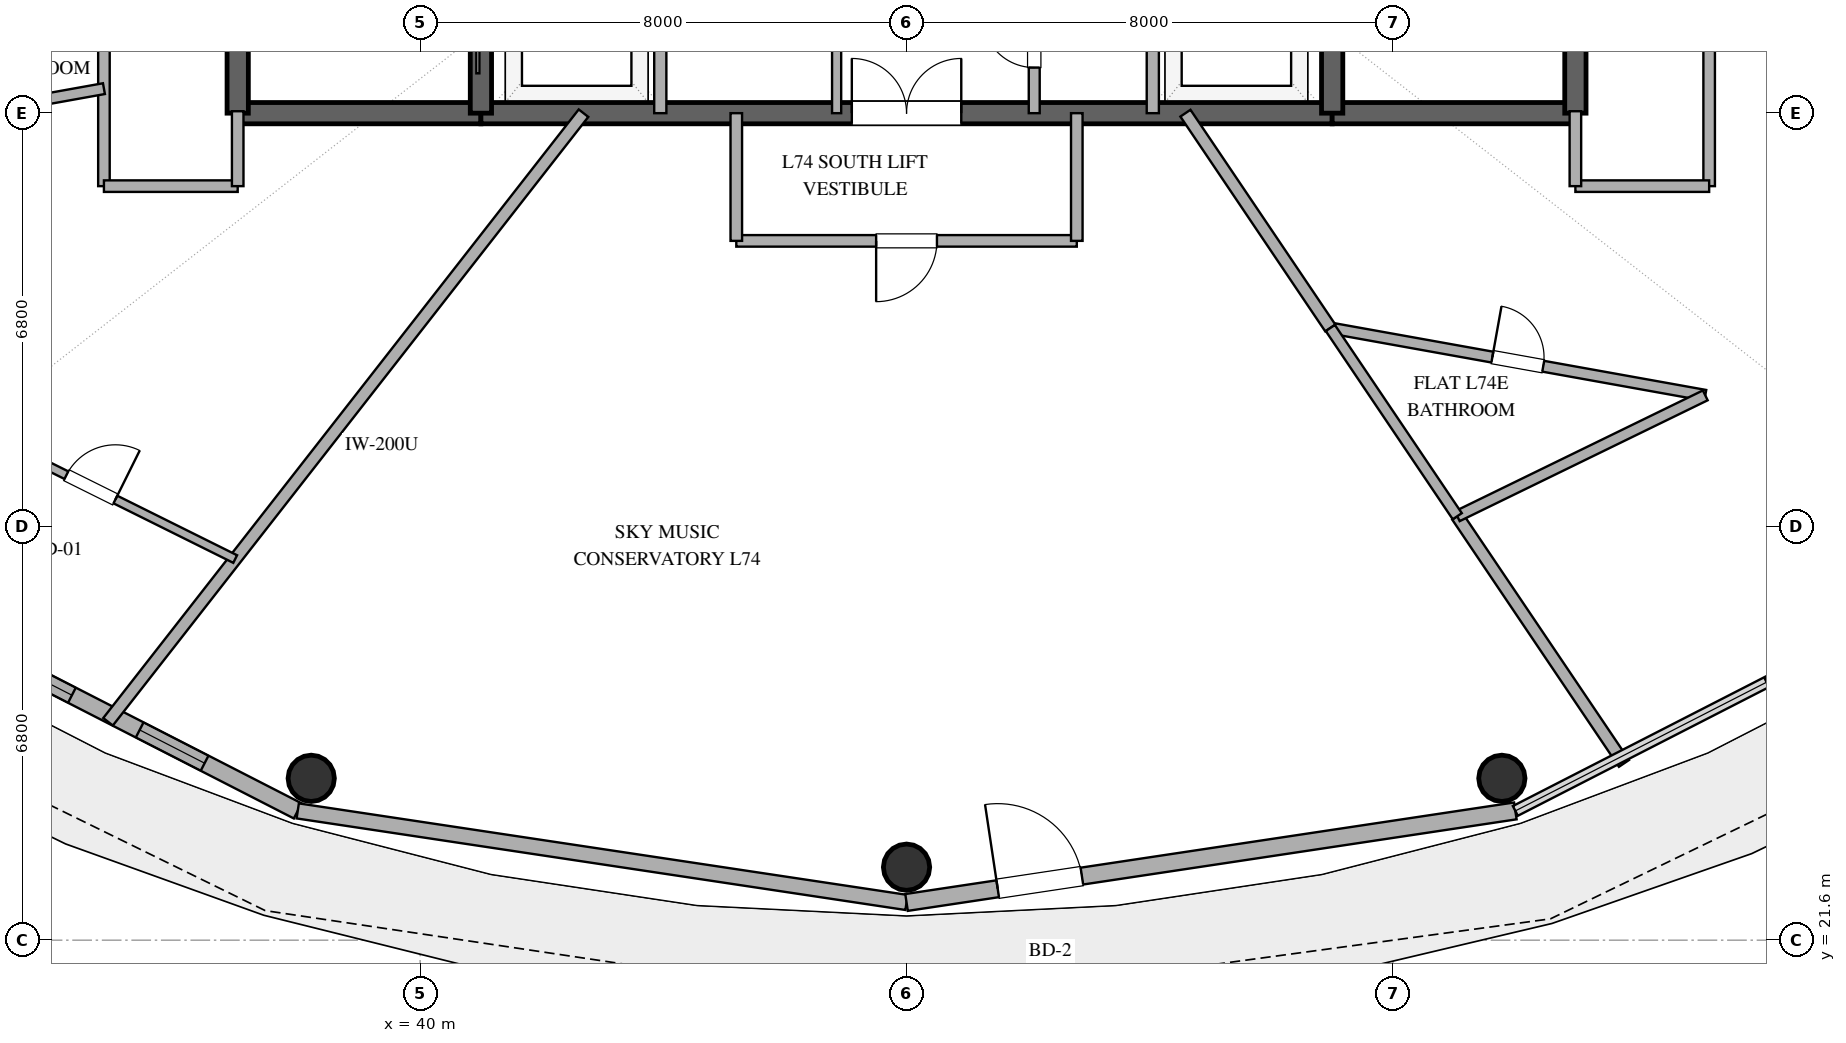
"""IFC4 building model, lengths in metres.
Left out: names, types, materials, properties, quantities, classifications, styles, units other than length and angle.
Written with IfcOpenShell. Run it as: python <this file> out.ifc"""

import sys

from ifc_helpers import new_model, si_unit, direction, frame, frame_2d, origin, origin_2d, place, context, subcontext, project, spatial, rectangle, hollow_circle, extrude, element, fill, save


model = new_model("IFC4")
c1 = context("Model", 3, precision=1e-05, world=origin(), true_north=direction((0.0, 1.0)))
c2 = subcontext(c1, "Body", "Model", "MODEL_VIEW")
j1 = project(units=[si_unit("LENGTHUNIT", "METRE"), si_unit("PLANEANGLEUNIT", "RADIAN")], contexts=[c1])
p1 = place(None, origin())
s1 = spatial("IfcSite", under=j1, at=p1, CompositionType="ELEMENT")
p2 = place(p1, origin())
s2 = spatial("IfcBuilding", under=s1, at=p2, CompositionType="ELEMENT")
p3 = place(p2, frame((0.0, 0.0, 287.4)))
s3 = spatial("IfcBuildingStorey", under=s2, at=p3, CompositionType="ELEMENT", Elevation=287.4)
p4 = place(p3, frame((37.0, 35.2, 0.0), z_axis=(0.0, 0.0, 1.0), x_axis=(1.0, 0.0, 0.0)))
e1 = element("IfcWall", 1, at=p4, inside=s3, PredefinedType="SHEAR", context=c2, shape_type="SweptSolid", body=[
    extrude(rectangle(XDim=4.0, YDim=0.35, at=frame_2d((2.0, 0.0))), origin(), (0.0, 0.0, 1.0), 3.37),
])
p5 = place(p3, frame((41.0, 35.2, 0.0), z_axis=(0.0, 0.0, 1.0), x_axis=(1.0, 0.0, 0.0)))
e2 = element("IfcWall", 2, at=p5, inside=s3, PredefinedType="SHEAR", context=c2, shape_type="SweptSolid", body=[
    extrude(rectangle(XDim=14.0, YDim=0.35, at=frame_2d((7.0, 0.0))), origin(), (0.0, 0.0, 1.0), 3.37),
])
p6 = place(p5, frame((6.1, 0.0, 0.0)))
e3 = element("IfcOpeningElement", 3, at=p6, cuts=e2, PredefinedType="OPENING", context=c2, shape_type="SweptSolid", body=[
    extrude(rectangle(XDim=1.8, YDim=2.25, at=frame_2d((0.9, 1.125))), frame((0.0, 0.185, 0.0), z_axis=(0.0, -1.0, 0.0), x_axis=(1.0, 0.0, 0.0)), (0.0, 0.0, 1.0), 0.37),
])
p7 = place(p3, frame((55.0, 35.2, 0.0), z_axis=(0.0, 0.0, 1.0), x_axis=(1.0, 0.0, 0.0)))
e4 = element("IfcWall", 4, at=p7, inside=s3, PredefinedType="SHEAR", context=c2, shape_type="SweptSolid", body=[
    extrude(rectangle(XDim=4.0, YDim=0.35, at=frame_2d((2.0, 0.0))), origin(), (0.0, 0.0, 1.0), 3.37),
])
p8 = place(p3, frame((37.0, 35.2, 0.0), z_axis=(0.0, 0.0, 1.0), x_axis=(0.0, 1.0, 0.0)))
e5 = element("IfcWall", 5, at=p8, inside=s3, PredefinedType="SHEAR", context=c2, shape_type="SweptSolid", body=[
    extrude(rectangle(XDim=13.6, YDim=0.35, at=frame_2d((6.8, 0.0))), origin(), (0.0, 0.0, 1.0), 3.37),
])
p9 = place(p8, frame((1.5, 0.0, 0.0)))
e6 = element("IfcOpeningElement", 6, at=p9, cuts=e5, PredefinedType="OPENING", context=c2, shape_type="SweptSolid", body=[
    extrude(rectangle(XDim=1.2, YDim=2.15, at=frame_2d((0.6, 1.075))), frame((0.0, 0.185, 0.0), z_axis=(0.0, -1.0, 0.0), x_axis=(1.0, 0.0, 0.0)), (0.0, 0.0, 1.0), 0.37),
])
p10 = place(p3, frame((59.0, 35.2, 0.0), z_axis=(0.0, 0.0, 1.0), x_axis=(0.0, 1.0, 0.0)))
e7 = element("IfcWall", 7, at=p10, inside=s3, PredefinedType="SHEAR", context=c2, shape_type="SweptSolid", body=[
    extrude(rectangle(XDim=13.6, YDim=0.35, at=frame_2d((6.8, 0.0))), origin(), (0.0, 0.0, 1.0), 3.37),
])
p11 = place(p10, frame((1.5, 0.0, 0.0)))
e8 = element("IfcOpeningElement", 8, at=p11, cuts=e7, PredefinedType="OPENING", context=c2, shape_type="SweptSolid", body=[
    extrude(rectangle(XDim=1.2, YDim=2.15, at=frame_2d((0.6, 1.075))), frame((0.0, 0.185, 0.0), z_axis=(0.0, -1.0, 0.0), x_axis=(1.0, 0.0, 0.0)), (0.0, 0.0, 1.0), 0.37),
])
p12 = place(p3, frame((41.0, 35.2, 0.0), z_axis=(0.0, 0.0, 1.0), x_axis=(0.0, 1.0, 0.0)))
e9 = element("IfcWall", 9, at=p12, inside=s3, PredefinedType="SHEAR", context=c2, shape_type="SweptSolid", body=[
    extrude(rectangle(XDim=13.6, YDim=0.35, at=frame_2d((6.8, 0.0))), origin(), (0.0, 0.0, 1.0), 3.37),
])
p13 = place(p12, frame((1.15, 0.0, 0.0)))
e10 = element("IfcOpeningElement", 10, at=p13, cuts=e9, PredefinedType="OPENING", context=c2, shape_type="SweptSolid", body=[
    extrude(rectangle(XDim=1.1, YDim=2.2, at=frame_2d((0.55, 1.1))), frame((0.0, 0.185, 0.0), z_axis=(0.0, -1.0, 0.0), x_axis=(1.0, 0.0, 0.0)), (0.0, 0.0, 1.0), 0.37),
])
p14 = place(p3, frame((55.0, 35.2, 0.0), z_axis=(0.0, 0.0, 1.0), x_axis=(0.0, 1.0, 0.0)))
e11 = element("IfcWall", 11, at=p14, inside=s3, PredefinedType="SHEAR", context=c2, shape_type="SweptSolid", body=[
    extrude(rectangle(XDim=13.6, YDim=0.35, at=frame_2d((6.8, 0.0))), origin(), (0.0, 0.0, 1.0), 3.37),
])
p15 = place(p14, frame((1.15, 0.0, 0.0)))
e12 = element("IfcOpeningElement", 12, at=p15, cuts=e11, PredefinedType="OPENING", context=c2, shape_type="SweptSolid", body=[
    extrude(rectangle(XDim=1.1, YDim=2.2, at=frame_2d((0.55, 1.1))), frame((0.0, 0.185, 0.0), z_axis=(0.0, -1.0, 0.0), x_axis=(1.0, 0.0, 0.0)), (0.0, 0.0, 1.0), 0.37),
])
for number, where, z_axis, x_axis in (
    (13, (38.209, 24.261, 0.0), (0.0, 0.0, 1.0), (1.0, 0.0, 0.0)),
    (14, (48.0, 22.8, 0.0), (0.0, 0.0, 1.0), (1.0, 0.0, 0.0)),
    (15, (57.791, 24.261, 0.0), (0.0, 0.0, 1.0), (1.0, 0.0, 0.0)),
):
    element("IfcColumn", number, at=place(p3, frame(where, z_axis=z_axis, x_axis=x_axis)), inside=s3, PredefinedType="COLUMN", context=c2, shape_type="SweptSolid", body=[
        extrude(hollow_circle(Radius=0.381, WallThickness=0.025, at=origin_2d()), origin(), (0.0, 0.0, 1.0), 3.37),
    ])
p16 = place(p3, frame((29.617, 28.013, 0.0), z_axis=(0.0, 0.0, 1.0), x_axis=(0.890007394051, -0.455946091699, 0.0)))
e16 = element("IfcWall", 16, at=p16, inside=s3, PredefinedType="SOLIDWALL", context=c2, shape_type="SweptSolid", body=[
    extrude(rectangle(XDim=9.404, YDim=0.28, at=frame_2d((4.702, 0.0))), origin(), (0.0, 0.0, 1.0), 3.37),
])
p17 = place(p16, frame((2.053, 0.0, 0.85)))
e17 = element("IfcOpeningElement", 17, at=p17, cuts=e16, PredefinedType="OPENING", context=c2, shape_type="SweptSolid", body=[
    extrude(rectangle(XDim=1.35, YDim=1.8, at=frame_2d((0.675, 0.9))), frame((0.0, 0.15, 0.0), z_axis=(0.0, -1.0, 0.0), x_axis=(1.0, 0.0, 0.0)), (0.0, 0.0, 1.0), 0.3),
])
p18 = place(p16, frame((3.881, 0.0, 0.85)))
e18 = element("IfcOpeningElement", 18, at=p18, cuts=e16, PredefinedType="OPENING", context=c2, shape_type="SweptSolid", body=[
    extrude(rectangle(XDim=1.35, YDim=1.8, at=frame_2d((0.675, 0.9))), frame((0.0, 0.15, 0.0), z_axis=(0.0, -1.0, 0.0), x_axis=(1.0, 0.0, 0.0)), (0.0, 0.0, 1.0), 0.3),
])
p19 = place(p16, frame((6.483, 0.0, 0.85)))
e19 = element("IfcOpeningElement", 19, at=p19, cuts=e16, PredefinedType="OPENING", context=c2, shape_type="SweptSolid", body=[
    extrude(rectangle(XDim=1.2, YDim=1.8, at=frame_2d((0.6, 0.9))), frame((0.0, 0.15, 0.0), z_axis=(0.0, -1.0, 0.0), x_axis=(1.0, 0.0, 0.0)), (0.0, 0.0, 1.0), 0.3),
])
p20 = place(p3, frame((37.987, 23.726, 0.0), z_axis=(0.0, 0.0, 1.0), x_axis=(0.988882522213, -0.148698881169, 0.0)))
e20 = element("IfcWall", 20, at=p20, inside=s3, PredefinedType="SOLIDWALL", context=c2, shape_type="SweptSolid", body=[
    extrude(rectangle(XDim=10.125, YDim=0.25, at=frame_2d((5.062, 0.0))), origin(), (0.0, 0.0, 1.0), 3.37),
])
p21 = place(p3, frame((48.0, 22.22, 0.0), z_axis=(0.0, 0.0, 1.0), x_axis=(0.988882522213, 0.148698881169, 0.0)))
e21 = element("IfcWall", 21, at=p21, inside=s3, PredefinedType="SOLIDWALL", context=c2, shape_type="SweptSolid", body=[
    extrude(rectangle(XDim=10.125, YDim=0.28, at=frame_2d((5.062, 0.0))), origin(), (0.0, 0.0, 1.0), 3.37),
])
p22 = place(p21, frame((1.516, 0.0, 0.0)))
e22 = element("IfcOpeningElement", 22, at=p22, cuts=e21, PredefinedType="OPENING", context=c2, shape_type="SweptSolid", body=[
    extrude(rectangle(XDim=1.4, YDim=2.2, at=frame_2d((0.7, 1.1))), frame((0.0, 0.15, 0.0), z_axis=(0.0, -1.0, 0.0), x_axis=(1.0, 0.0, 0.0)), (0.0, 0.0, 1.0), 0.3),
])
for number, where, z_axis, x_axis in (
    (23, (43.95, 35.2, 0.0), (0.0, 0.0, 1.0), (0.0, 1.0, 0.0)),
    (24, (52.05, 35.2, 0.0), (0.0, 0.0, 1.0), (0.0, 1.0, 0.0)),
):
    element("IfcWall", number, at=place(p3, frame(where, z_axis=z_axis, x_axis=x_axis)), inside=s3, PredefinedType="SOLIDWALL", context=c2, shape_type="SweptSolid", body=[
        extrude(rectangle(XDim=3.2, YDim=0.2, at=frame_2d((1.6, 0.0))), origin(), (0.0, 0.0, 1.0), 2.73),
    ])
p23 = place(p3, frame((46.85, 35.2, 0.0), z_axis=(0.0, 0.0, 1.0), x_axis=(0.0, 1.0, 0.0)))
e25 = element("IfcWall", 25, at=p23, inside=s3, PredefinedType="PARTITIONING", context=c2, shape_type="SweptSolid", body=[
    extrude(rectangle(XDim=3.2, YDim=0.15, at=frame_2d((1.6, 0.0))), origin(), (0.0, 0.0, 1.0), 2.73),
])
p24 = place(p23, frame((1.15, 0.0, 0.0)))
e26 = element("IfcOpeningElement", 26, at=p24, cuts=e25, PredefinedType="OPENING", context=c2, shape_type="SweptSolid", body=[
    extrude(rectangle(XDim=0.9, YDim=2.15, at=frame_2d((0.45, 1.075))), frame((0.0, 0.085, 0.0), z_axis=(0.0, -1.0, 0.0), x_axis=(1.0, 0.0, 0.0)), (0.0, 0.0, 1.0), 0.17),
])
p25 = place(p3, frame((50.1, 35.2, 0.0), z_axis=(0.0, 0.0, 1.0), x_axis=(0.0, 1.0, 0.0)))
e27 = element("IfcWall", 27, at=p25, inside=s3, PredefinedType="PLUMBINGWALL", context=c2, shape_type="SweptSolid", body=[
    extrude(rectangle(XDim=2.45, YDim=0.18, at=frame_2d((1.225, 0.0))), origin(), (0.0, 0.0, 1.0), 2.73),
])
p26 = place(p25, frame((0.75, 0.0, 0.0)))
e28 = element("IfcOpeningElement", 28, at=p26, cuts=e27, PredefinedType="OPENING", context=c2, shape_type="SweptSolid", body=[
    extrude(rectangle(XDim=0.85, YDim=2.1, at=frame_2d((0.425, 1.05))), frame((0.0, 0.1, 0.0), z_axis=(0.0, -1.0, 0.0), x_axis=(1.0, 0.0, 0.0)), (0.0, 0.0, 1.0), 0.2),
])
p27 = place(p3, frame((61.2, 50.9, 0.0), z_axis=(0.0, 0.0, 1.0), x_axis=(0.0, -1.0, 0.0)))
e29 = element("IfcWall", 29, at=p27, inside=s3, PredefinedType="PARTITIONING", context=c2, shape_type="SweptSolid", body=[
    extrude(rectangle(XDim=16.9, YDim=0.19, at=frame_2d((8.45, 0.0))), origin(), (0.0, 0.0, 1.0), 2.73),
])
p28 = place(p27, frame((8.873, 0.0, 0.0)))
e30 = element("IfcOpeningElement", 30, at=p28, cuts=e29, PredefinedType="OPENING", context=c2, shape_type="SweptSolid", body=[
    extrude(rectangle(XDim=1.0, YDim=2.2, at=frame_2d((0.5, 1.1))), frame((0.0, 0.105, 0.0), z_axis=(0.0, -1.0, 0.0), x_axis=(1.0, 0.0, 0.0)), (0.0, 0.0, 1.0), 0.21),
])
p29 = place(p3, frame((42.687, 35.2, 0.0), z_axis=(0.0, 0.0, 1.0), x_axis=(-0.615663811723, -0.788008928208, 0.0)))
e31 = element("IfcWall", 31, at=p29, inside=s3, PredefinedType="PARTITIONING", context=c2, shape_type="SweptSolid", body=[
    extrude(rectangle(XDim=12.701, YDim=0.2, at=frame_2d((6.351, 0.0))), origin(), (0.0, 0.0, 1.0), 2.73),
])
p30 = place(p3, frame((34.8, 34.0, 0.0), z_axis=(0.0, 0.0, 1.0), x_axis=(0.0, 1.0, 0.0)))
e32 = element("IfcWall", 32, at=p30, inside=s3, PredefinedType="PARTITIONING", context=c2, shape_type="SweptSolid", body=[
    extrude(rectangle(XDim=16.9, YDim=0.19, at=frame_2d((8.45, 0.0))), origin(), (0.0, 0.0, 1.0), 2.73),
])
p31 = place(p30, frame((7.627, 0.0, 0.0)))
e33 = element("IfcOpeningElement", 33, at=p31, cuts=e32, PredefinedType="OPENING", context=c2, shape_type="SweptSolid", body=[
    extrude(rectangle(XDim=1.0, YDim=2.2, at=frame_2d((0.5, 1.1))), frame((0.0, 0.105, 0.0), z_axis=(0.0, -1.0, 0.0), x_axis=(1.0, 0.0, 0.0)), (0.0, 0.0, 1.0), 0.21),
])
p32 = place(p3, frame((54.97, 31.667, 0.0), z_axis=(0.0, 0.0, 1.0), x_axis=(0.98424617738, -0.176803456736, 0.0)))
e34 = element("IfcWall", 34, at=p32, inside=s3, PredefinedType="PLUMBINGWALL", context=c2, shape_type="SweptSolid", body=[
    extrude(rectangle(XDim=6.265, YDim=0.18, at=frame_2d((3.132, 0.0))), origin(), (0.0, 0.0, 1.0), 2.73),
])
p33 = place(p32, frame((2.708, 0.0, 0.0)))
e35 = element("IfcOpeningElement", 35, at=p33, cuts=e34, PredefinedType="OPENING", context=c2, shape_type="SweptSolid", body=[
    extrude(rectangle(XDim=0.85, YDim=2.1, at=frame_2d((0.425, 1.05))), frame((0.0, 0.1, 0.0), z_axis=(0.0, -1.0, 0.0), x_axis=(1.0, 0.0, 0.0)), (0.0, 0.0, 1.0), 0.2),
])
p34 = place(p3, frame((34.8, 37.964, 0.0), z_axis=(0.0, 0.0, 1.0), x_axis=(-0.956308169094, -0.292360540641, 0.0)))
e36 = element("IfcWall", 36, at=p34, inside=s3, PredefinedType="PLUMBINGWALL", context=c2, shape_type="SweptSolid", body=[
    extrude(rectangle(XDim=6.028, YDim=0.18, at=frame_2d((3.014, 0.0))), origin(), (0.0, 0.0, 1.0), 2.73),
])
p35 = place(p34, frame((2.589, 0.0, 0.0)))
e37 = element("IfcOpeningElement", 37, at=p35, cuts=e36, PredefinedType="OPENING", context=c2, shape_type="SweptSolid", body=[
    extrude(rectangle(XDim=0.85, YDim=2.1, at=frame_2d((0.425, 1.05))), frame((0.0, 0.1, 0.0), z_axis=(0.0, -1.0, 0.0), x_axis=(1.0, 0.0, 0.0)), (0.0, 0.0, 1.0), 0.2),
])
p36 = place(p3, frame((50.8, 33.1, 0.0), z_axis=(0.0, 0.0, 1.0), x_axis=(-1.0, 0.0, 0.0)))
e38 = element("IfcWall", 38, at=p36, inside=s3, PredefinedType="PARTITIONING", context=c2, shape_type="SweptSolid", body=[
    extrude(rectangle(XDim=5.6, YDim=0.19, at=frame_2d((2.8, 0.0))), origin(), (0.0, 0.0, 1.0), 2.73),
])
p37 = place(p36, frame((2.3, 0.0, 0.0)))
e39 = element("IfcOpeningElement", 39, at=p37, cuts=e38, PredefinedType="OPENING", context=c2, shape_type="SweptSolid", body=[
    extrude(rectangle(XDim=1.0, YDim=2.2, at=frame_2d((0.5, 1.1))), frame((0.0, 0.105, 0.0), z_axis=(0.0, -1.0, 0.0), x_axis=(1.0, 0.0, 0.0)), (0.0, 0.0, 1.0), 0.21),
])
p38 = place(p3, frame((32.212, 30.226, 0.0), z_axis=(0.0, 0.0, 1.0), x_axis=(0.895575883974, -0.444908795197, 0.0)))
e40 = element("IfcWall", 40, at=p38, inside=s3, PredefinedType="PARTITIONING", context=c2, shape_type="SweptSolid", body=[
    extrude(rectangle(XDim=5.3, YDim=0.14, at=frame_2d((2.65, 0.0))), origin(), (0.0, 0.0, 1.0), 2.73),
])
p39 = place(p38, frame((2.2, 0.0, 0.0)))
e41 = element("IfcOpeningElement", 41, at=p39, cuts=e40, PredefinedType="OPENING", context=c2, shape_type="SweptSolid", body=[
    extrude(rectangle(XDim=0.9, YDim=2.1, at=frame_2d((0.45, 1.05))), frame((0.0, 0.08, 0.0), z_axis=(0.0, -1.0, 0.0), x_axis=(1.0, 0.0, 0.0)), (0.0, 0.0, 1.0), 0.16),
])
p40 = place(p3, frame((59.799, 24.507, 0.0), z_axis=(0.0, 0.0, 1.0), x_axis=(-0.559196589516, 0.829035086274, 0.0)))
e42 = element("IfcWall", 42, at=p40, inside=s3, PredefinedType="PARTITIONING", context=c2, shape_type="SweptSolid", body=[
    extrude(rectangle(XDim=4.903, YDim=0.2, at=frame_2d((2.451, 0.0))), origin(), (0.0, 0.0, 1.0), 2.73),
])
p41 = place(p3, frame((30.265, 34.789, 0.0), z_axis=(0.0, 0.0, 1.0), x_axis=(0.984250881723, 0.176777266148, 0.0)))
e43 = element("IfcWall", 43, at=p41, inside=s3, PredefinedType="PLUMBINGWALL", context=c2, shape_type="SweptSolid", body=[
    extrude(rectangle(XDim=4.607, YDim=0.18, at=frame_2d((2.304, 0.0))), origin(), (0.0, 0.0, 1.0), 2.73),
])
p42 = place(p3, frame((61.136, 30.559, 0.0), z_axis=(0.0, 0.0, 1.0), x_axis=(-0.898933361371, -0.438085393291, 0.0)))
e44 = element("IfcWall", 44, at=p42, inside=s3, PredefinedType="PLUMBINGWALL", context=c2, shape_type="SweptSolid", body=[
    extrude(rectangle(XDim=4.537, YDim=0.18, at=frame_2d((2.269, 0.0))), origin(), (0.0, 0.0, 1.0), 2.73),
])
p43 = place(p3, frame((54.97, 31.667, 0.0), z_axis=(0.0, 0.0, 1.0), x_axis=(-0.559200276542, 0.829032599308, 0.0)))
e45 = element("IfcWall", 45, at=p43, inside=s3, PredefinedType="PARTITIONING", context=c2, shape_type="SweptSolid", body=[
    extrude(rectangle(XDim=4.261, YDim=0.2, at=frame_2d((2.131, 0.0))), origin(), (0.0, 0.0, 1.0), 2.73),
])
p44 = place(p3, frame((57.058, 28.572, 0.0), z_axis=(0.0, 0.0, 1.0), x_axis=(-0.559219016168, 0.82901995872, 0.0)))
e46 = element("IfcWall", 46, at=p44, inside=s3, PredefinedType="PLUMBINGWALL", context=c2, shape_type="SweptSolid", body=[
    extrude(rectangle(XDim=3.734, YDim=0.18, at=frame_2d((1.867, 0.0))), origin(), (0.0, 0.0, 1.0), 2.73),
])
for number, where, z_axis, x_axis in (
    (47, (37.0, 34.0, 0.0), (0.0, 0.0, 1.0), (-1.0, 0.0, 0.0)),
    (48, (61.2, 34.0, 0.0), (0.0, 0.0, 1.0), (-1.0, 0.0, 0.0)),
):
    element("IfcWall", number, at=place(p3, frame(where, z_axis=z_axis, x_axis=x_axis)), inside=s3, PredefinedType="PARTITIONING", context=c2, shape_type="SweptSolid", body=[
        extrude(rectangle(XDim=2.2, YDim=0.19, at=frame_2d((1.1, 0.0))), origin(), (0.0, 0.0, 1.0), 2.73),
    ])
for number, where, z_axis, x_axis in (
    (49, (50.8, 35.2, 0.0), (0.0, 0.0, 1.0), (0.0, -1.0, 0.0)),
    (50, (45.2, 33.1, 0.0), (0.0, 0.0, 1.0), (0.0, 1.0, 0.0)),
):
    element("IfcWall", number, at=place(p3, frame(where, z_axis=z_axis, x_axis=x_axis)), inside=s3, PredefinedType="PARTITIONING", context=c2, shape_type="SweptSolid", body=[
        extrude(rectangle(XDim=2.1, YDim=0.19, at=frame_2d((1.05, 0.0))), origin(), (0.0, 0.0, 1.0), 2.73),
    ])
for number, where, z_axis, x_axis in (
    (51, (37.0, 35.232, 0.0), (0.0, 0.0, 1.0), (0.0, -1.0, 0.0)),
    (52, (59.0, 34.0, 0.0), (0.0, 0.0, 1.0), (0.0, 1.0, 0.0)),
):
    element("IfcWall", number, at=place(p3, frame(where, z_axis=z_axis, x_axis=x_axis)), inside=s3, PredefinedType="PARTITIONING", context=c2, shape_type="SweptSolid", body=[
        extrude(rectangle(XDim=1.232, YDim=0.19, at=frame_2d((0.616, 0.0))), origin(), (0.0, 0.0, 1.0), 2.73),
    ])
p45 = place(p18, origin())
e53 = element("IfcWindow", 53, at=p45, inside=s3, PartitioningType="SINGLE_PANEL", PredefinedType="WINDOW", context=c2, shape_type="SweptSolid", body=[
    extrude(rectangle(XDim=1.35, YDim=1.8, at=frame_2d((0.675, 0.9))), frame((0.0, 0.03, 0.0), z_axis=(0.0, -1.0, 0.0), x_axis=(1.0, 0.0, 0.0)), (0.0, 0.0, 1.0), 0.06),
])
fill(e18, e53)
p46 = place(p19, origin())
e54 = element("IfcWindow", 54, at=p46, inside=s3, PartitioningType="SINGLE_PANEL", PredefinedType="WINDOW", context=c2, shape_type="SweptSolid", body=[
    extrude(rectangle(XDim=1.2, YDim=1.8, at=frame_2d((0.6, 0.9))), frame((0.0, 0.03, 0.0), z_axis=(0.0, -1.0, 0.0), x_axis=(1.0, 0.0, 0.0)), (0.0, 0.0, 1.0), 0.06),
])
fill(e19, e54)
p47 = place(p22, origin())
e55 = element("IfcDoor", 55, at=p47, inside=s3, OperationType="SINGLE_SWING_LEFT", PredefinedType="DOOR", context=c2, shape_type="SweptSolid", body=[
    extrude(rectangle(XDim=1.4, YDim=2.2, at=frame_2d((0.7, 1.1))), frame((0.0, 0.025, 0.0), z_axis=(0.0, -1.0, 0.0), x_axis=(1.0, 0.0, 0.0)), (0.0, 0.0, 1.0), 0.05),
])
fill(e22, e55)
p48 = place(p6, origin())
e56 = element("IfcDoor", 56, at=p48, inside=s3, OperationType="DOUBLE_DOOR_SINGLE_SWING", PredefinedType="DOOR", context=c2, shape_type="SweptSolid", body=[
    extrude(rectangle(XDim=1.8, YDim=2.25, at=frame_2d((0.9, 1.125))), frame((0.0, 0.025, 0.0), z_axis=(0.0, -1.0, 0.0), x_axis=(1.0, 0.0, 0.0)), (0.0, 0.0, 1.0), 0.05),
])
fill(e3, e56)
p49 = place(p26, origin())
e57 = element("IfcDoor", 57, at=p49, inside=s3, OperationType="SINGLE_SWING_RIGHT", PredefinedType="DOOR", context=c2, shape_type="SweptSolid", body=[
    extrude(rectangle(XDim=0.85, YDim=2.1, at=frame_2d((0.425, 1.05))), frame((0.0, 0.025, 0.0), z_axis=(0.0, -1.0, 0.0), x_axis=(1.0, 0.0, 0.0)), (0.0, 0.0, 1.0), 0.05),
])
fill(e28, e57)
p50 = place(p33, origin())
e58 = element("IfcDoor", 58, at=p50, inside=s3, OperationType="SINGLE_SWING_LEFT", PredefinedType="DOOR", context=c2, shape_type="SweptSolid", body=[
    extrude(rectangle(XDim=0.85, YDim=2.1, at=frame_2d((0.425, 1.05))), frame((0.0, 0.025, 0.0), z_axis=(0.0, -1.0, 0.0), x_axis=(1.0, 0.0, 0.0)), (0.0, 0.0, 1.0), 0.05),
])
fill(e35, e58)
p51 = place(p37, origin())
e59 = element("IfcDoor", 59, at=p51, inside=s3, OperationType="SINGLE_SWING_RIGHT", PredefinedType="DOOR", context=c2, shape_type="SweptSolid", body=[
    extrude(rectangle(XDim=1.0, YDim=2.2, at=frame_2d((0.5, 1.1))), frame((0.0, 0.025, 0.0), z_axis=(0.0, -1.0, 0.0), x_axis=(1.0, 0.0, 0.0)), (0.0, 0.0, 1.0), 0.05),
])
fill(e39, e59)
p52 = place(p39, origin())
e60 = element("IfcDoor", 60, at=p52, inside=s3, OperationType="SINGLE_SWING_RIGHT", PredefinedType="DOOR", context=c2, shape_type="SweptSolid", body=[
    extrude(rectangle(XDim=0.9, YDim=2.1, at=frame_2d((0.45, 1.05))), frame((0.0, 0.025, 0.0), z_axis=(0.0, -1.0, 0.0), x_axis=(1.0, 0.0, 0.0)), (0.0, 0.0, 1.0), 0.05),
])
fill(e41, e60)
save(model, sys.argv[1])
